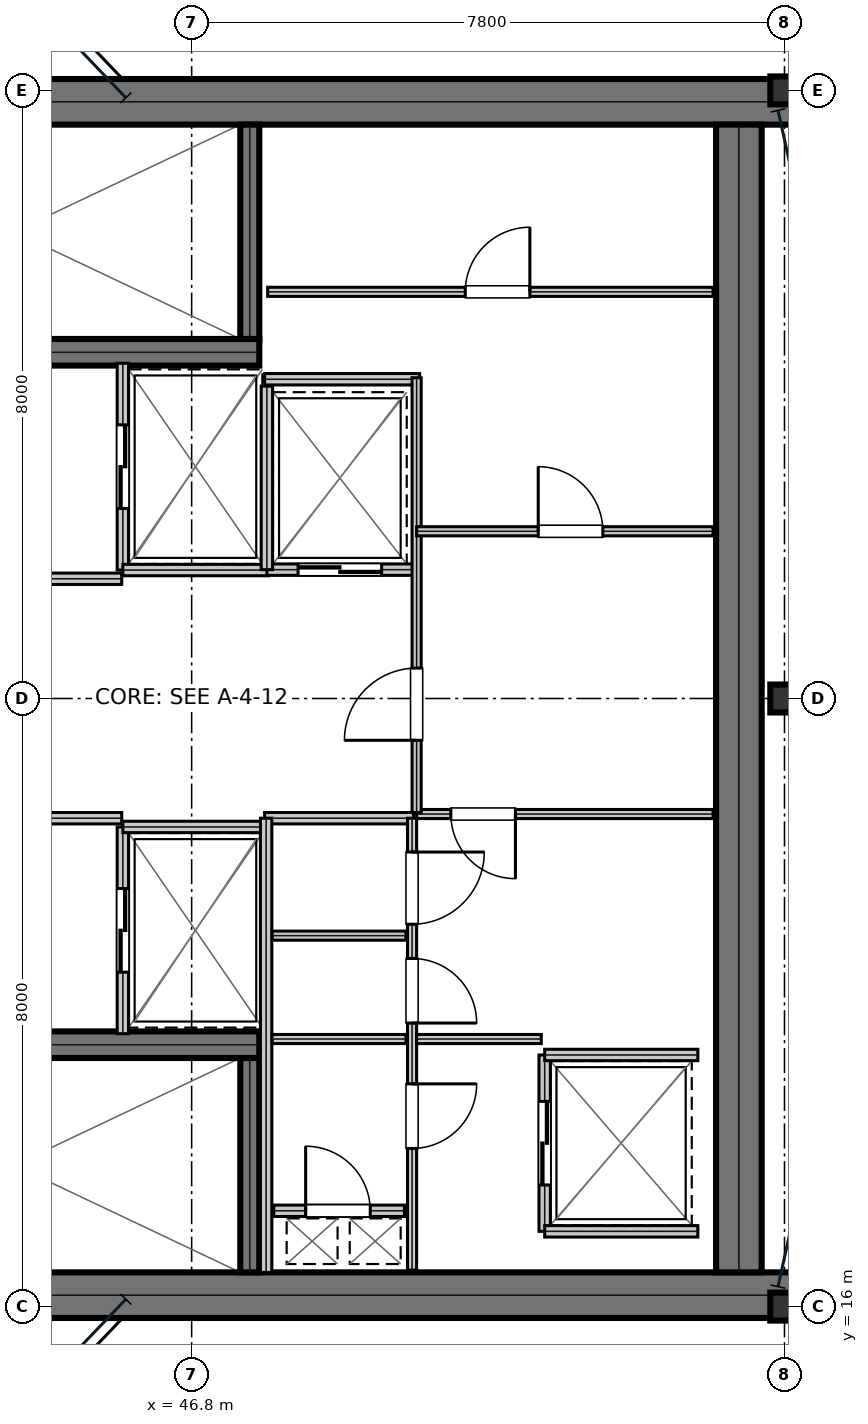
"""IFC4 building model, lengths in metres.
Left out: names, types, materials, properties, quantities, classifications, styles, units other than length and angle.
Written with IfcOpenShell. Run it as: python <this file> out.ifc"""

import sys

from ifc_helpers import new_model, si_unit, direction, frame, frame_2d, origin, origin_2d, place, context, subcontext, project, spatial, rectangle, i_section, extrude, element, fill, save


model = new_model("IFC4")
c1 = context("Model", 3, precision=1e-05, world=origin(), true_north=direction((0.0, 1.0)))
c2 = subcontext(c1, "Body", "Model", "MODEL_VIEW")
j1 = project(units=[si_unit("LENGTHUNIT", "METRE"), si_unit("PLANEANGLEUNIT", "RADIAN")], contexts=[c1])
p1 = place(None, origin())
s1 = spatial("IfcSite", under=j1, at=p1, CompositionType="ELEMENT")
p2 = place(p1, origin())
s2 = spatial("IfcBuilding", under=s1, at=p2, CompositionType="ELEMENT")
p3 = place(p2, frame((0.0, 0.0, 291.15)))
s3 = spatial("IfcBuildingStorey", under=s2, at=p3, CompositionType="ELEMENT", Elevation=291.15)
for number, where, z_axis, x_axis in (
    (1, (38.8, 31.85, 0.0), (0.0, 0.0, 1.0), (1.0, 0.0, 0.0)),
    (2, (38.8, 16.15, 0.0), (0.0, 0.0, 1.0), (1.0, 0.0, 0.0)),
):
    element("IfcWall", number, at=place(p3, frame(where, z_axis=z_axis, x_axis=x_axis)), inside=s3, PredefinedType="SHEAR", context=c2, shape_type="SweptSolid", body=[
        extrude(rectangle(XDim=16.0, YDim=0.6, at=frame_2d((8.0, 0.0))), origin(), (0.0, 0.0, 1.0), 3.81),
    ])
p4 = place(p3, frame((54.0, 16.45, 0.0), z_axis=(0.0, 0.0, 1.0), x_axis=(0.0, 1.0, 0.0)))
e3 = element("IfcWall", 3, at=p4, inside=s3, PredefinedType="SHEAR", context=c2, shape_type="SweptSolid", body=[
    extrude(rectangle(XDim=15.1, YDim=0.6, at=frame_2d((7.55, 0.0))), origin(), (0.0, 0.0, 1.0), 3.81),
])
p5 = place(p3, frame((39.98, 28.555, 0.0), z_axis=(0.0, 0.0, 1.0), x_axis=(1.0, 0.0, 0.0)))
e4 = element("IfcWall", 4, at=p5, inside=s3, PredefinedType="SHEAR", context=c2, shape_type="SweptSolid", body=[
    extrude(rectangle(XDim=7.71, YDim=0.35, at=frame_2d((3.855, 0.0))), origin(), (0.0, 0.0, 1.0), 3.81),
])
p6 = place(p5, frame((0.25, 0.0, 0.0)))
e5 = element("IfcOpeningElement", 5, at=p6, cuts=e4, PredefinedType="OPENING", context=c2, shape_type="SweptSolid", body=[
    extrude(rectangle(XDim=1.1, YDim=2.15, at=frame_2d((0.55, 1.075))), frame((0.0, 0.185, 0.0), z_axis=(0.0, -1.0, 0.0), x_axis=(1.0, 0.0, 0.0)), (0.0, 0.0, 1.0), 0.37),
])
p7 = place(p3, frame((39.98, 19.445, 0.0), z_axis=(0.0, 0.0, 1.0), x_axis=(1.0, 0.0, 0.0)))
e6 = element("IfcWall", 6, at=p7, inside=s3, PredefinedType="SHEAR", context=c2, shape_type="SweptSolid", body=[
    extrude(rectangle(XDim=7.71, YDim=0.35, at=frame_2d((3.855, 0.0))), origin(), (0.0, 0.0, 1.0), 3.81),
])
p8 = place(p7, frame((0.25, 0.0, 0.0)))
e7 = element("IfcOpeningElement", 7, at=p8, cuts=e6, PredefinedType="OPENING", context=c2, shape_type="SweptSolid", body=[
    extrude(rectangle(XDim=1.1, YDim=2.15, at=frame_2d((0.55, 1.075))), frame((0.0, 0.185, 0.0), z_axis=(0.0, -1.0, 0.0), x_axis=(1.0, 0.0, 0.0)), (0.0, 0.0, 1.0), 0.37),
])
for number, where, z_axis, x_axis in (
    (8, (47.565, 28.73, 0.0), (0.0, 0.0, 1.0), (0.0, 1.0, 0.0)),
    (9, (47.565, 16.45, 0.0), (0.0, 0.0, 1.0), (0.0, 1.0, 0.0)),
):
    element("IfcWall", number, at=place(p3, frame(where, z_axis=z_axis, x_axis=x_axis)), inside=s3, PredefinedType="SHEAR", context=c2, shape_type="SweptSolid", body=[
        extrude(rectangle(XDim=2.82, YDim=0.25, at=frame_2d((1.41, 0.0))), origin(), (0.0, 0.0, 1.0), 3.81),
    ])
for number, where, z_axis, x_axis in (
    (10, (54.6, 16.0, 0.0), (0.0, 0.0, 1.0), (1.0, 0.0, 0.0)),
    (11, (54.6, 24.0, 0.0), (0.0, 0.0, 1.0), (1.0, 0.0, 0.0)),
    (12, (54.6, 32.0, 0.0), (0.0, 0.0, 1.0), (1.0, 0.0, 0.0)),
):
    element("IfcColumn", number, at=place(p3, frame(where, z_axis=z_axis, x_axis=x_axis)), inside=s3, PredefinedType="COLUMN", context=c2, shape_type="SweptSolid", body=[
        extrude(i_section(OverallWidth=0.373, OverallDepth=0.368, WebThickness=0.015, FlangeThickness=0.024, at=origin_2d()), origin(), (0.0, 0.0, 1.0), 4.044),
    ])
p9 = place(p3, frame((39.98, 25.575, 0.0), z_axis=(0.0, 0.0, 1.0), x_axis=(1.0, 0.0, 0.0)))
e13 = element("IfcWall", 13, at=p9, inside=s3, PredefinedType="PARTITIONING", context=c2, shape_type="SweptSolid", body=[
    extrude(rectangle(XDim=5.9, YDim=0.15, at=frame_2d((2.95, 0.0))), origin(), (0.0, 0.0, 1.0), 3.81),
])
p10 = place(p9, frame((2.35, 0.0, 0.0)))
e14 = element("IfcOpeningElement", 14, at=p10, cuts=e13, PredefinedType="OPENING", context=c2, shape_type="SweptSolid", body=[
    extrude(rectangle(XDim=1.05, YDim=2.15, at=frame_2d((0.525, 1.075))), frame((0.0, 0.085, 0.0), z_axis=(0.0, -1.0, 0.0), x_axis=(1.0, 0.0, 0.0)), (0.0, 0.0, 1.0), 0.17),
])
p11 = place(p3, frame((39.98, 22.425, 0.0), z_axis=(0.0, 0.0, 1.0), x_axis=(1.0, 0.0, 0.0)))
e15 = element("IfcWall", 15, at=p11, inside=s3, PredefinedType="PARTITIONING", context=c2, shape_type="SweptSolid", body=[
    extrude(rectangle(XDim=5.9, YDim=0.15, at=frame_2d((2.95, 0.0))), origin(), (0.0, 0.0, 1.0), 3.81),
])
p12 = place(p11, frame((2.35, 0.0, 0.0)))
e16 = element("IfcOpeningElement", 16, at=p12, cuts=e15, PredefinedType="OPENING", context=c2, shape_type="SweptSolid", body=[
    extrude(rectangle(XDim=1.05, YDim=2.15, at=frame_2d((0.525, 1.075))), frame((0.0, 0.085, 0.0), z_axis=(0.0, -1.0, 0.0), x_axis=(1.0, 0.0, 0.0)), (0.0, 0.0, 1.0), 0.17),
])
p13 = place(p3, frame((45.895, 25.69, 0.0), z_axis=(0.0, 0.0, 1.0), x_axis=(0.0, 1.0, 0.0)))
e17 = element("IfcWall", 17, at=p13, inside=s3, PredefinedType="PARTITIONING", context=c2, shape_type="SweptSolid", body=[
    extrude(rectangle(XDim=2.72, YDim=0.15, at=frame_2d((1.36, 0.0))), origin(), (0.0, 0.0, 1.0), 3.81),
])
p14 = place(p13, frame((0.81, 0.0, 0.0)))
e18 = element("IfcOpeningElement", 18, at=p14, cuts=e17, PredefinedType="OPENING", context=c2, shape_type="SweptSolid", body=[
    extrude(rectangle(XDim=1.1, YDim=2.15, at=frame_2d((0.55, 1.075))), frame((0.0, 0.085, 0.0), z_axis=(0.0, -1.0, 0.0), x_axis=(1.0, 0.0, 0.0)), (0.0, 0.0, 1.0), 0.17),
])
p15 = place(p3, frame((45.895, 25.69, 0.0), z_axis=(0.0, 0.0, 1.0), x_axis=(1.0, 0.0, 0.0)))
e19 = element("IfcWall", 19, at=p15, inside=s3, PredefinedType="PARTITIONING", context=c2, shape_type="SweptSolid", body=[
    extrude(rectangle(XDim=1.915, YDim=0.15, at=frame_2d((0.958, 0.0))), origin(), (0.0, 0.0, 1.0), 3.81),
])
p16 = place(p3, frame((45.895, 19.59, 0.0), z_axis=(0.0, 0.0, 1.0), x_axis=(0.0, 1.0, 0.0)))
e20 = element("IfcWall", 20, at=p16, inside=s3, PredefinedType="PARTITIONING", context=c2, shape_type="SweptSolid", body=[
    extrude(rectangle(XDim=2.72, YDim=0.15, at=frame_2d((1.36, 0.0))), origin(), (0.0, 0.0, 1.0), 3.81),
])
p17 = place(p16, frame((0.81, 0.0, 0.0)))
e21 = element("IfcOpeningElement", 21, at=p17, cuts=e20, PredefinedType="OPENING", context=c2, shape_type="SweptSolid", body=[
    extrude(rectangle(XDim=1.1, YDim=2.15, at=frame_2d((0.55, 1.075))), frame((0.0, 0.085, 0.0), z_axis=(0.0, -1.0, 0.0), x_axis=(1.0, 0.0, 0.0)), (0.0, 0.0, 1.0), 0.17),
])
p18 = place(p3, frame((45.895, 22.31, 0.0), z_axis=(0.0, 0.0, 1.0), x_axis=(1.0, 0.0, 0.0)))
e22 = element("IfcWall", 22, at=p18, inside=s3, PredefinedType="PARTITIONING", context=c2, shape_type="SweptSolid", body=[
    extrude(rectangle(XDim=1.915, YDim=0.15, at=frame_2d((0.958, 0.0))), origin(), (0.0, 0.0, 1.0), 3.81),
])
p19 = place(p3, frame((47.79, 25.695, 0.0), z_axis=(0.0, 0.0, 1.0), x_axis=(1.0, 0.0, 0.0)))
e23 = element("IfcWall", 23, at=p19, inside=s3, PredefinedType="PARTITIONING", context=c2, shape_type="SweptSolid", body=[
    extrude(rectangle(XDim=1.92, YDim=0.15, at=frame_2d((0.96, 0.0))), origin(), (0.0, 0.0, 1.0), 3.81),
])
p20 = place(p19, frame((0.41, 0.0, 0.0)))
e24 = element("IfcOpeningElement", 24, at=p20, cuts=e23, PredefinedType="OPENING", context=c2, shape_type="SweptSolid", body=[
    extrude(rectangle(XDim=1.1, YDim=2.15, at=frame_2d((0.55, 1.075))), frame((0.0, 0.085, 0.0), z_axis=(0.0, -1.0, 0.0), x_axis=(1.0, 0.0, 0.0)), (0.0, 0.0, 1.0), 0.17),
])
p21 = place(p3, frame((47.79, 25.695, 0.0), z_axis=(0.0, 0.0, 1.0), x_axis=(0.0, 1.0, 0.0)))
e25 = element("IfcWall", 25, at=p21, inside=s3, PredefinedType="PARTITIONING", context=c2, shape_type="SweptSolid", body=[
    extrude(rectangle(XDim=2.415, YDim=0.15, at=frame_2d((1.208, 0.0))), origin(), (0.0, 0.0, 1.0), 3.81),
])
p22 = place(p3, frame((51.445, 16.99, 0.0), z_axis=(0.0, 0.0, 1.0), x_axis=(0.0, 1.0, 0.0)))
e26 = element("IfcWall", 26, at=p22, inside=s3, PredefinedType="PARTITIONING", context=c2, shape_type="SweptSolid", body=[
    extrude(rectangle(XDim=2.32, YDim=0.15, at=frame_2d((1.16, 0.0))), origin(), (0.0, 0.0, 1.0), 3.81),
])
p23 = place(p22, frame((0.61, 0.0, 0.0)))
e27 = element("IfcOpeningElement", 27, at=p23, cuts=e26, PredefinedType="OPENING", context=c2, shape_type="SweptSolid", body=[
    extrude(rectangle(XDim=1.1, YDim=2.15, at=frame_2d((0.55, 1.075))), frame((0.0, 0.085, 0.0), z_axis=(0.0, -1.0, 0.0), x_axis=(1.0, 0.0, 0.0)), (0.0, 0.0, 1.0), 0.17),
])
for number, where, z_axis, x_axis in (
    (28, (51.445, 16.99, 0.0), (0.0, 0.0, 1.0), (1.0, 0.0, 0.0)),
    (29, (51.445, 19.31, 0.0), (0.0, 0.0, 1.0), (1.0, 0.0, 0.0)),
):
    element("IfcWall", number, at=place(p3, frame(where, z_axis=z_axis, x_axis=x_axis)), inside=s3, PredefinedType="PARTITIONING", context=c2, shape_type="SweptSolid", body=[
        extrude(rectangle(XDim=2.015, YDim=0.15, at=frame_2d((1.007, 0.0))), origin(), (0.0, 0.0, 1.0), 3.81),
    ])
p24 = place(p3, frame((47.88, 17.26, 0.0), z_axis=(0.0, 0.0, 1.0), x_axis=(1.0, 0.0, 0.0)))
e30 = element("IfcWall", 30, at=p24, inside=s3, PredefinedType="PARTITIONING", context=c2, shape_type="SweptSolid", body=[
    extrude(rectangle(XDim=1.72, YDim=0.15, at=frame_2d((0.86, 0.0))), origin(), (0.0, 0.0, 1.0), 3.81),
])
p25 = place(p24, frame((0.42, 0.0, 0.0)))
e31 = element("IfcOpeningElement", 31, at=p25, cuts=e30, PredefinedType="OPENING", context=c2, shape_type="SweptSolid", body=[
    extrude(rectangle(XDim=0.85, YDim=2.15, at=frame_2d((0.425, 1.075))), frame((0.0, 0.085, 0.0), z_axis=(0.0, -1.0, 0.0), x_axis=(1.0, 0.0, 0.0)), (0.0, 0.0, 1.0), 0.17),
])
p26 = place(p3, frame((47.76, 22.425, 0.0), z_axis=(0.0, 0.0, 1.0), x_axis=(1.0, 0.0, 0.0)))
e32 = element("IfcWall", 32, at=p26, inside=s3, PredefinedType="PARTITIONING", context=c2, shape_type="SweptSolid", body=[
    extrude(rectangle(XDim=1.96, YDim=0.15, at=frame_2d((0.98, 0.0))), origin(), (0.0, 0.0, 1.0), 3.81),
])
p27 = place(p3, frame((47.78, 16.45, 0.0), z_axis=(0.0, 0.0, 1.0), x_axis=(0.0, 1.0, 0.0)))
e33 = element("IfcWall", 33, at=p27, inside=s3, PredefinedType="PARTITIONING", context=c2, shape_type="SweptSolid", body=[
    extrude(rectangle(XDim=5.975, YDim=0.15, at=frame_2d((2.988, 0.0))), origin(), (0.0, 0.0, 1.0), 3.81),
])
for number, where, z_axis, x_axis in (
    (34, (47.86, 19.52, 0.0), (0.0, 0.0, 1.0), (1.0, 0.0, 0.0)),
    (35, (47.86, 20.88, 0.0), (0.0, 0.0, 1.0), (1.0, 0.0, 0.0)),
):
    element("IfcWall", number, at=place(p3, frame(where, z_axis=z_axis, x_axis=x_axis)), inside=s3, PredefinedType="PARTITIONING", context=c2, shape_type="SweptSolid", body=[
        extrude(rectangle(XDim=1.76, YDim=0.12, at=frame_2d((0.88, 0.0))), origin(), (0.0, 0.0, 1.0), 3.81),
    ])
p28 = place(p3, frame((49.7, 16.48, 0.0), z_axis=(0.0, 0.0, 1.0), x_axis=(0.0, 1.0, 0.0)))
e36 = element("IfcWall", 36, at=p28, inside=s3, PredefinedType="PARTITIONING", context=c2, shape_type="SweptSolid", body=[
    extrude(rectangle(XDim=5.945, YDim=0.12, at=frame_2d((2.973, 0.0))), origin(), (0.0, 0.0, 1.0), 3.81),
])
p29 = place(p28, frame((1.6, 0.0, 0.0)))
e37 = element("IfcOpeningElement", 37, at=p29, cuts=e36, PredefinedType="OPENING", context=c2, shape_type="SweptSolid", body=[
    extrude(rectangle(XDim=0.85, YDim=2.15, at=frame_2d((0.425, 1.075))), frame((0.0, 0.07, 0.0), z_axis=(0.0, -1.0, 0.0), x_axis=(1.0, 0.0, 0.0)), (0.0, 0.0, 1.0), 0.14),
])
p30 = place(p28, frame((3.25, 0.0, 0.0)))
e38 = element("IfcOpeningElement", 38, at=p30, cuts=e36, PredefinedType="OPENING", context=c2, shape_type="SweptSolid", body=[
    extrude(rectangle(XDim=0.85, YDim=2.15, at=frame_2d((0.425, 1.075))), frame((0.0, 0.07, 0.0), z_axis=(0.0, -1.0, 0.0), x_axis=(1.0, 0.0, 0.0)), (0.0, 0.0, 1.0), 0.14),
])
p31 = place(p28, frame((4.55, 0.0, 0.0)))
e39 = element("IfcOpeningElement", 39, at=p31, cuts=e36, PredefinedType="OPENING", context=c2, shape_type="SweptSolid", body=[
    extrude(rectangle(XDim=0.95, YDim=2.15, at=frame_2d((0.475, 1.075))), frame((0.0, 0.07, 0.0), z_axis=(0.0, -1.0, 0.0), x_axis=(1.0, 0.0, 0.0)), (0.0, 0.0, 1.0), 0.14),
])
p32 = place(p3, frame((49.76, 22.48, 0.0), z_axis=(0.0, 0.0, 1.0), x_axis=(1.0, 0.0, 0.0)))
e40 = element("IfcWall", 40, at=p32, inside=s3, PredefinedType="PARTITIONING", context=c2, shape_type="SweptSolid", body=[
    extrude(rectangle(XDim=3.9, YDim=0.12, at=frame_2d((1.95, 0.0))), origin(), (0.0, 0.0, 1.0), 3.81),
])
p33 = place(p32, frame((0.45, 0.0, 0.0)))
e41 = element("IfcOpeningElement", 41, at=p33, cuts=e40, PredefinedType="OPENING", context=c2, shape_type="SweptSolid", body=[
    extrude(rectangle(XDim=0.85, YDim=2.15, at=frame_2d((0.425, 1.075))), frame((0.0, 0.07, 0.0), z_axis=(0.0, -1.0, 0.0), x_axis=(1.0, 0.0, 0.0)), (0.0, 0.0, 1.0), 0.14),
])
p34 = place(p3, frame((49.76, 19.52, 0.0), z_axis=(0.0, 0.0, 1.0), x_axis=(1.0, 0.0, 0.0)))
e42 = element("IfcWall", 42, at=p34, inside=s3, PredefinedType="PARTITIONING", context=c2, shape_type="SweptSolid", body=[
    extrude(rectangle(XDim=1.64, YDim=0.12, at=frame_2d((0.82, 0.0))), origin(), (0.0, 0.0, 1.0), 3.81),
])
p35 = place(p3, frame((47.76, 28.2, 0.0), z_axis=(0.0, 0.0, 1.0), x_axis=(1.0, 0.0, 0.0)))
e43 = element("IfcWall", 43, at=p35, inside=s3, PredefinedType="PARTITIONING", context=c2, shape_type="SweptSolid", body=[
    extrude(rectangle(XDim=2.04, YDim=0.15, at=frame_2d((1.02, 0.0))), origin(), (0.0, 0.0, 1.0), 3.81),
])
p36 = place(p3, frame((49.76, 22.5, 0.0), z_axis=(0.0, 0.0, 1.0), x_axis=(0.0, 1.0, 0.0)))
e44 = element("IfcWall", 44, at=p36, inside=s3, PredefinedType="PARTITIONING", context=c2, shape_type="SweptSolid", body=[
    extrude(rectangle(XDim=5.72, YDim=0.12, at=frame_2d((2.86, 0.0))), origin(), (0.0, 0.0, 1.0), 3.81),
])
p37 = place(p36, frame((0.95, 0.0, 0.0)))
e45 = element("IfcOpeningElement", 45, at=p37, cuts=e44, PredefinedType="OPENING", context=c2, shape_type="SweptSolid", body=[
    extrude(rectangle(XDim=0.95, YDim=2.15, at=frame_2d((0.475, 1.075))), frame((0.0, 0.07, 0.0), z_axis=(0.0, -1.0, 0.0), x_axis=(1.0, 0.0, 0.0)), (0.0, 0.0, 1.0), 0.14),
])
p38 = place(p3, frame((49.76, 26.2, 0.0), z_axis=(0.0, 0.0, 1.0), x_axis=(1.0, 0.0, 0.0)))
e46 = element("IfcWall", 46, at=p38, inside=s3, PredefinedType="PARTITIONING", context=c2, shape_type="SweptSolid", body=[
    extrude(rectangle(XDim=3.9, YDim=0.12, at=frame_2d((1.95, 0.0))), origin(), (0.0, 0.0, 1.0), 3.81),
])
p39 = place(p38, frame((1.6, 0.0, 0.0)))
e47 = element("IfcOpeningElement", 47, at=p39, cuts=e46, PredefinedType="OPENING", context=c2, shape_type="SweptSolid", body=[
    extrude(rectangle(XDim=0.85, YDim=2.15, at=frame_2d((0.425, 1.075))), frame((0.0, 0.07, 0.0), z_axis=(0.0, -1.0, 0.0), x_axis=(1.0, 0.0, 0.0)), (0.0, 0.0, 1.0), 0.14),
])
p40 = place(p3, frame((47.8, 29.35, 0.0), z_axis=(0.0, 0.0, 1.0), x_axis=(1.0, 0.0, 0.0)))
e48 = element("IfcWall", 48, at=p40, inside=s3, PredefinedType="PARTITIONING", context=c2, shape_type="SweptSolid", body=[
    extrude(rectangle(XDim=5.86, YDim=0.12, at=frame_2d((2.93, 0.0))), origin(), (0.0, 0.0, 1.0), 3.81),
])
p41 = place(p40, frame((2.6, 0.0, 0.0)))
e49 = element("IfcOpeningElement", 49, at=p41, cuts=e48, PredefinedType="OPENING", context=c2, shape_type="SweptSolid", body=[
    extrude(rectangle(XDim=0.85, YDim=2.15, at=frame_2d((0.425, 1.075))), frame((0.0, 0.07, 0.0), z_axis=(0.0, -1.0, 0.0), x_axis=(1.0, 0.0, 0.0)), (0.0, 0.0, 1.0), 0.14),
])
p42 = place(p14, frame((1.1, 0.0, 0.0), z_axis=(0.0, 0.0, 1.0), x_axis=(-1.0, 0.0, 0.0)))
e50 = element("IfcDoor", 50, at=p42, inside=s3, OperationType="DOUBLE_DOOR_SLIDING", PredefinedType="DOOR", context=c2, shape_type="SweptSolid", body=[
    extrude(rectangle(XDim=1.1, YDim=2.15, at=frame_2d((0.55, 1.075))), frame((0.0, 0.025, 0.0), z_axis=(0.0, -1.0, 0.0), x_axis=(1.0, 0.0, 0.0)), (0.0, 0.0, 1.0), 0.05),
])
fill(e18, e50)
p43 = place(p17, frame((1.1, 0.0, 0.0), z_axis=(0.0, 0.0, 1.0), x_axis=(-1.0, 0.0, 0.0)))
e51 = element("IfcDoor", 51, at=p43, inside=s3, OperationType="DOUBLE_DOOR_SLIDING", PredefinedType="DOOR", context=c2, shape_type="SweptSolid", body=[
    extrude(rectangle(XDim=1.1, YDim=2.15, at=frame_2d((0.55, 1.075))), frame((0.0, 0.025, 0.0), z_axis=(0.0, -1.0, 0.0), x_axis=(1.0, 0.0, 0.0)), (0.0, 0.0, 1.0), 0.05),
])
fill(e21, e51)
p44 = place(p20, frame((1.1, 0.0, 0.0), z_axis=(0.0, 0.0, 1.0), x_axis=(-1.0, 0.0, 0.0)))
e52 = element("IfcDoor", 52, at=p44, inside=s3, OperationType="DOUBLE_DOOR_SLIDING", PredefinedType="DOOR", context=c2, shape_type="SweptSolid", body=[
    extrude(rectangle(XDim=1.1, YDim=2.15, at=frame_2d((0.55, 1.075))), frame((0.0, 0.025, 0.0), z_axis=(0.0, -1.0, 0.0), x_axis=(1.0, 0.0, 0.0)), (0.0, 0.0, 1.0), 0.05),
])
fill(e24, e52)
p45 = place(p23, frame((1.1, 0.0, 0.0), z_axis=(0.0, 0.0, 1.0), x_axis=(-1.0, 0.0, 0.0)))
e53 = element("IfcDoor", 53, at=p45, inside=s3, OperationType="DOUBLE_DOOR_SLIDING", PredefinedType="DOOR", context=c2, shape_type="SweptSolid", body=[
    extrude(rectangle(XDim=1.1, YDim=2.15, at=frame_2d((0.55, 1.075))), frame((0.0, 0.025, 0.0), z_axis=(0.0, -1.0, 0.0), x_axis=(1.0, 0.0, 0.0)), (0.0, 0.0, 1.0), 0.05),
])
fill(e27, e53)
p46 = place(p25, origin())
e54 = element("IfcDoor", 54, at=p46, inside=s3, OperationType="SINGLE_SWING_LEFT", PredefinedType="TRAPDOOR", context=c2, shape_type="SweptSolid", body=[
    extrude(rectangle(XDim=0.85, YDim=2.15, at=frame_2d((0.425, 1.075))), frame((0.0, 0.025, 0.0), z_axis=(0.0, -1.0, 0.0), x_axis=(1.0, 0.0, 0.0)), (0.0, 0.0, 1.0), 0.05),
])
fill(e31, e54)
p47 = place(p29, frame((0.85, 0.0, 0.0), z_axis=(0.0, 0.0, 1.0), x_axis=(-1.0, 0.0, 0.0)))
e55 = element("IfcDoor", 55, at=p47, inside=s3, OperationType="SINGLE_SWING_LEFT", PredefinedType="DOOR", context=c2, shape_type="SweptSolid", body=[
    extrude(rectangle(XDim=0.85, YDim=2.15, at=frame_2d((0.425, 1.075))), frame((0.0, 0.025, 0.0), z_axis=(0.0, -1.0, 0.0), x_axis=(1.0, 0.0, 0.0)), (0.0, 0.0, 1.0), 0.05),
])
fill(e37, e55)
p48 = place(p30, frame((0.85, 0.0, 0.0), z_axis=(0.0, 0.0, 1.0), x_axis=(-1.0, 0.0, 0.0)))
e56 = element("IfcDoor", 56, at=p48, inside=s3, OperationType="SINGLE_SWING_RIGHT", PredefinedType="DOOR", context=c2, shape_type="SweptSolid", body=[
    extrude(rectangle(XDim=0.85, YDim=2.15, at=frame_2d((0.425, 1.075))), frame((0.0, 0.025, 0.0), z_axis=(0.0, -1.0, 0.0), x_axis=(1.0, 0.0, 0.0)), (0.0, 0.0, 1.0), 0.05),
])
fill(e38, e56)
p49 = place(p31, frame((0.95, 0.0, 0.0), z_axis=(0.0, 0.0, 1.0), x_axis=(-1.0, 0.0, 0.0)))
e57 = element("IfcDoor", 57, at=p49, inside=s3, OperationType="SINGLE_SWING_LEFT", PredefinedType="DOOR", context=c2, shape_type="SweptSolid", body=[
    extrude(rectangle(XDim=0.95, YDim=2.15, at=frame_2d((0.475, 1.075))), frame((0.0, 0.025, 0.0), z_axis=(0.0, -1.0, 0.0), x_axis=(1.0, 0.0, 0.0)), (0.0, 0.0, 1.0), 0.05),
])
fill(e39, e57)
p50 = place(p33, frame((0.85, 0.0, 0.0), z_axis=(0.0, 0.0, 1.0), x_axis=(-1.0, 0.0, 0.0)))
e58 = element("IfcDoor", 58, at=p50, inside=s3, OperationType="SINGLE_SWING_LEFT", PredefinedType="DOOR", context=c2, shape_type="SweptSolid", body=[
    extrude(rectangle(XDim=0.85, YDim=2.15, at=frame_2d((0.425, 1.075))), frame((0.0, 0.025, 0.0), z_axis=(0.0, -1.0, 0.0), x_axis=(1.0, 0.0, 0.0)), (0.0, 0.0, 1.0), 0.05),
])
fill(e41, e58)
p51 = place(p37, origin())
e59 = element("IfcDoor", 59, at=p51, inside=s3, OperationType="SINGLE_SWING_LEFT", PredefinedType="DOOR", context=c2, shape_type="SweptSolid", body=[
    extrude(rectangle(XDim=0.95, YDim=2.15, at=frame_2d((0.475, 1.075))), frame((0.0, 0.025, 0.0), z_axis=(0.0, -1.0, 0.0), x_axis=(1.0, 0.0, 0.0)), (0.0, 0.0, 1.0), 0.05),
])
fill(e45, e59)
p52 = place(p39, origin())
e60 = element("IfcDoor", 60, at=p52, inside=s3, OperationType="SINGLE_SWING_LEFT", PredefinedType="DOOR", context=c2, shape_type="SweptSolid", body=[
    extrude(rectangle(XDim=0.85, YDim=2.15, at=frame_2d((0.425, 1.075))), frame((0.0, 0.025, 0.0), z_axis=(0.0, -1.0, 0.0), x_axis=(1.0, 0.0, 0.0)), (0.0, 0.0, 1.0), 0.05),
])
fill(e47, e60)
p53 = place(p41, origin())
e61 = element("IfcDoor", 61, at=p53, inside=s3, OperationType="SINGLE_SWING_RIGHT", PredefinedType="DOOR", context=c2, shape_type="SweptSolid", body=[
    extrude(rectangle(XDim=0.85, YDim=2.15, at=frame_2d((0.425, 1.075))), frame((0.0, 0.025, 0.0), z_axis=(0.0, -1.0, 0.0), x_axis=(1.0, 0.0, 0.0)), (0.0, 0.0, 1.0), 0.05),
])
fill(e49, e61)
save(model, sys.argv[1])
